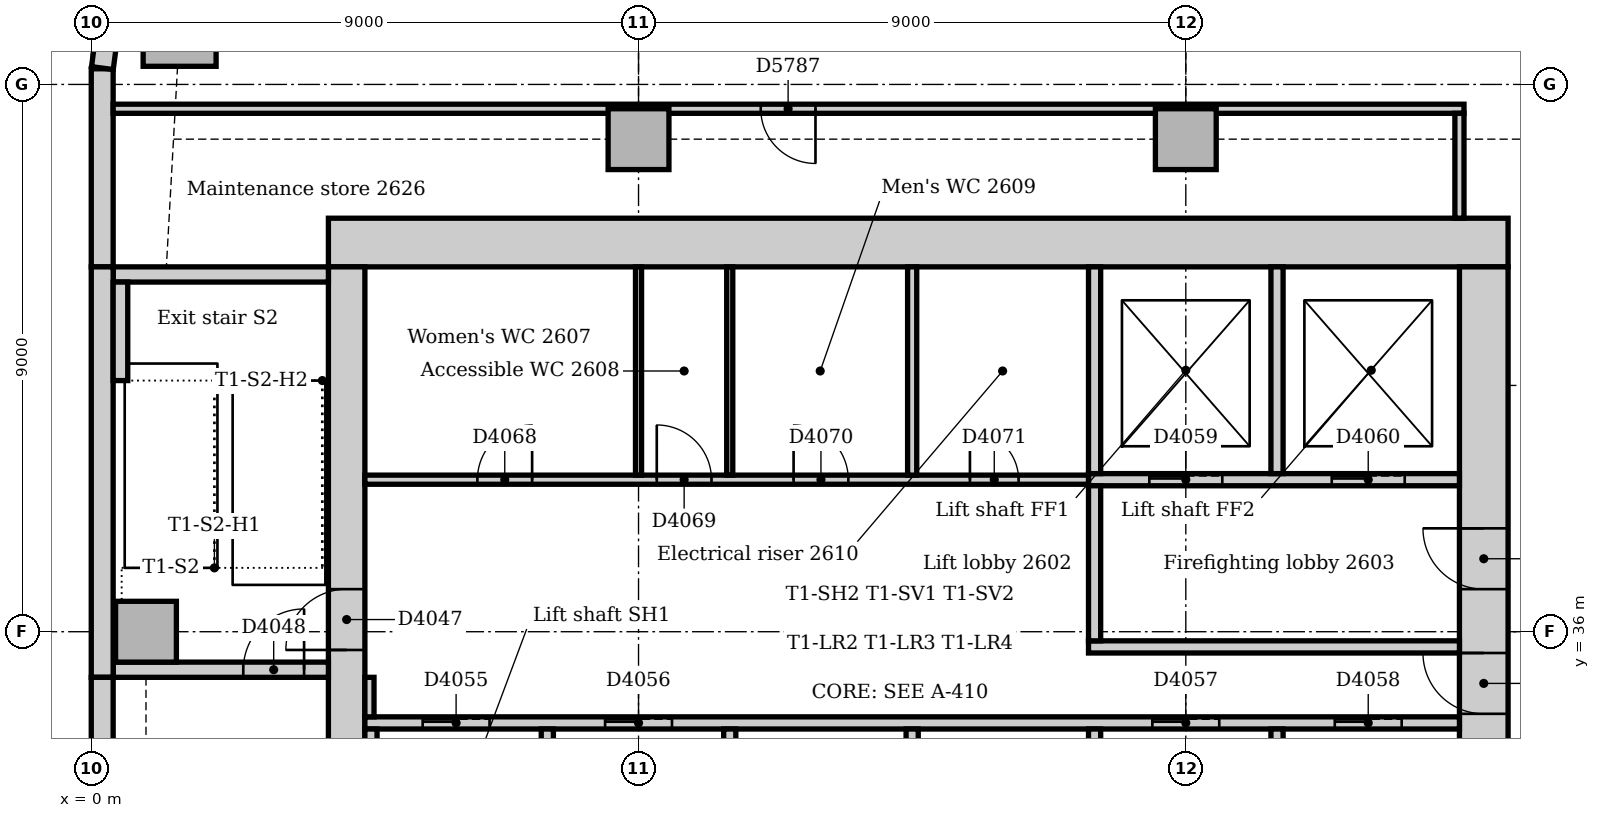
"""IFC4 building model, lengths in metres.
Left out: names, types, materials, properties, quantities, classifications, styles, units other than length and angle.
Written with IfcOpenShell. Run it as: python <this file> out.ifc"""

import sys

from ifc_helpers import new_model, si_unit, direction, frame, frame_2d, origin, origin_2d, place, context, subcontext, project, spatial, rectangle, extrude, element, fill, save


model = new_model("IFC4")
c1 = context("Model", 3, precision=1e-05, world=origin(), true_north=direction((0.0, 1.0)))
c2 = subcontext(c1, "Body", "Model", "MODEL_VIEW")
j1 = project(units=[si_unit("LENGTHUNIT", "METRE"), si_unit("PLANEANGLEUNIT", "RADIAN")], contexts=[c1])
p1 = place(None, origin())
s1 = spatial("IfcSite", under=j1, at=p1, CompositionType="ELEMENT")
p2 = place(p1, origin())
s2 = spatial("IfcBuilding", under=s1, at=p2, CompositionType="ELEMENT")
p3 = place(p2, frame((0.0, 0.0, 112.0)))
s3 = spatial("IfcBuildingStorey", under=s2, at=p3, CompositionType="ELEMENT", Elevation=112.0)
p4 = place(p3, frame((23.3, 42.4, 0.0), z_axis=(0.0, 0.0, 1.0), x_axis=(-1.0, 0.0, 0.0)))
e1 = element("IfcWall", 1, at=p4, inside=s3, PredefinedType="SOLIDWALL", context=c2, shape_type="SweptSolid", body=[
    extrude(rectangle(XDim=19.4, YDim=0.8, at=frame_2d((9.7, 0.0))), origin(), (0.0, 0.0, 1.0), 4.0),
])
p5 = place(p3, frame((22.9, 31.5, 0.0), z_axis=(0.0, 0.0, 1.0), x_axis=(0.0, 1.0, 0.0)))
e2 = element("IfcWall", 2, at=p5, inside=s3, PredefinedType="SOLIDWALL", context=c2, shape_type="SweptSolid", body=[
    extrude(rectangle(XDim=10.5, YDim=0.8, at=frame_2d((5.25, 0.0))), origin(), (0.0, 0.0, 1.0), 4.0),
])
p6 = place(p5, frame((3.15, 0.0, 0.0)))
e3 = element("IfcOpeningElement", 3, at=p6, cuts=e2, PredefinedType="OPENING", context=c2, shape_type="SweptSolid", body=[
    extrude(rectangle(XDim=1.0, YDim=2.1, at=frame_2d((0.5, 1.05))), frame((0.0, 0.41, 0.0), z_axis=(0.0, -1.0, 0.0), x_axis=(1.0, 0.0, 0.0)), (0.0, 0.0, 1.0), 0.82),
])
p7 = place(p5, frame((5.2, 0.0, 0.0)))
e4 = element("IfcOpeningElement", 4, at=p7, cuts=e2, PredefinedType="OPENING", context=c2, shape_type="SweptSolid", body=[
    extrude(rectangle(XDim=1.0, YDim=2.1, at=frame_2d((0.5, 1.05))), frame((0.0, 0.41, 0.0), z_axis=(0.0, -1.0, 0.0), x_axis=(1.0, 0.0, 0.0)), (0.0, 0.0, 1.0), 0.82),
])
p8 = place(p3, frame((4.2, 42.0, 0.0), z_axis=(0.0, 0.0, 1.0), x_axis=(0.0, -1.0, 0.0)))
e5 = element("IfcWall", 5, at=p8, inside=s3, PredefinedType="SOLIDWALL", context=c2, shape_type="SweptSolid", body=[
    extrude(rectangle(XDim=10.5, YDim=0.6, at=frame_2d((5.25, 0.0))), origin(), (0.0, 0.0, 1.0), 4.0),
])
p9 = place(p8, frame((5.3, 0.0, 0.0)))
e6 = element("IfcOpeningElement", 6, at=p9, cuts=e5, PredefinedType="OPENING", context=c2, shape_type="SweptSolid", body=[
    extrude(rectangle(XDim=1.0, YDim=2.1, at=frame_2d((0.5, 1.05))), frame((0.0, 0.31, 0.0), z_axis=(0.0, -1.0, 0.0), x_axis=(1.0, 0.0, 0.0)), (0.0, 0.0, 1.0), 0.62),
])
p10 = place(p3, frame((0.36, 35.375, 0.0), z_axis=(0.0, 0.0, 1.0), x_axis=(1.0, 0.0, 0.0)))
e7 = element("IfcWall", 7, at=p10, inside=s3, PredefinedType="SOLIDWALL", context=c2, shape_type="SweptSolid", body=[
    extrude(rectangle(XDim=3.54, YDim=0.25, at=frame_2d((1.77, 0.0))), origin(), (0.0, 0.0, 1.0), 4.0),
])
p11 = place(p10, frame((2.14, 0.0, 0.0)))
e8 = element("IfcOpeningElement", 8, at=p11, cuts=e7, PredefinedType="OPENING", context=c2, shape_type="SweptSolid", body=[
    extrude(rectangle(XDim=1.0, YDim=2.1, at=frame_2d((0.5, 1.05))), frame((0.0, 0.135, 0.0), z_axis=(0.0, -1.0, 0.0), x_axis=(1.0, 0.0, 0.0)), (0.0, 0.0, 1.0), 0.27),
])
p12 = place(p3, frame((3.9, 41.875, 0.0), z_axis=(0.0, 0.0, 1.0), x_axis=(-1.0, 0.0, 0.0)))
e9 = element("IfcWall", 9, at=p12, inside=s3, PredefinedType="SOLIDWALL", context=c2, shape_type="SweptSolid", body=[
    extrude(rectangle(XDim=3.54, YDim=0.25, at=frame_2d((1.77, 0.0))), origin(), (0.0, 0.0, 1.0), 4.0),
])
p13 = place(p3, frame((1.453, 45.898, 0.0), z_axis=(0.0, 0.0, 1.0), x_axis=(1.0, 0.0, 0.0)))
e10 = element("IfcColumn", 10, at=p13, inside=s3, PredefinedType="COLUMN", context=c2, shape_type="SweptSolid", body=[
    extrude(rectangle(XDim=1.2, YDim=1.2, at=origin_2d()), origin(), (0.0, 0.0, 1.0), 3.85),
])
p14 = place(p3, frame((0.9, 36.0, 0.0), z_axis=(0.0, 0.0, 1.0), x_axis=(1.0, 0.0, 0.0)))
e11 = element("IfcColumn", 11, at=p14, inside=s3, PredefinedType="COLUMN", context=c2, shape_type="SweptSolid", body=[
    extrude(rectangle(XDim=1.0, YDim=1.0, at=origin_2d()), origin(), (0.0, 0.0, 1.0), 4.0),
])
for number, where, z_axis, x_axis in (
    (12, (9.0, 44.1, 0.0), (0.0, 0.0, 1.0), (1.0, 0.0, 0.0)),
    (13, (18.0, 44.1, 0.0), (0.0, 0.0, 1.0), (1.0, 0.0, 0.0)),
):
    element("IfcColumn", number, at=place(p3, frame(where, z_axis=z_axis, x_axis=x_axis)), inside=s3, PredefinedType="COLUMN", context=c2, shape_type="SweptSolid", body=[
        extrude(rectangle(XDim=1.0, YDim=1.0, at=origin_2d()), origin(), (0.0, 0.0, 1.0), 3.85),
    ])
p15 = place(p3, frame((0.18, 45.257, 0.0), z_axis=(0.0, 0.0, 1.0), x_axis=(0.0, -1.0, 0.0)))
e14 = element("IfcWall", 14, at=p15, inside=s3, PredefinedType="STANDARD", context=c2, shape_type="SweptSolid", body=[
    extrude(rectangle(XDim=3.257, YDim=0.36, at=frame_2d((1.629, 0.0))), origin(), (0.0, 0.0, 1.0), 3.85),
])
p16 = place(p3, frame((0.18, 42.0, 0.0), z_axis=(0.0, 0.0, 1.0), x_axis=(0.0, -1.0, 0.0)))
e15 = element("IfcWall", 15, at=p16, inside=s3, PredefinedType="STANDARD", context=c2, shape_type="SweptSolid", body=[
    extrude(rectangle(XDim=6.75, YDim=0.36, at=frame_2d((3.375, 0.0))), origin(), (0.0, 0.0, 1.0), 3.85),
])
p17 = place(p3, frame((0.18, 35.25, 0.0), z_axis=(0.0, 0.0, 1.0), x_axis=(0.0, -1.0, 0.0)))
e16 = element("IfcWall", 16, at=p17, inside=s3, PredefinedType="STANDARD", context=c2, shape_type="SweptSolid", body=[
    extrude(rectangle(XDim=7.5, YDim=0.36, at=frame_2d((3.75, 0.0))), origin(), (0.0, 0.0, 1.0), 3.85),
])
p18 = place(p3, frame((0.276, 45.976, 0.0), z_axis=(0.0, 0.0, 1.0), x_axis=(-0.13055608231, -0.99144092581, 0.0)))
e17 = element("IfcWall", 17, at=p18, inside=s3, PredefinedType="STANDARD", context=c2, shape_type="SweptSolid", body=[
    extrude(rectangle(XDim=0.713, YDim=0.36, at=frame_2d((0.356, 0.0))), origin(), (0.0, 0.0, 1.0), 3.85),
])
p19 = place(p3, frame((0.48, 40.13, 0.0), z_axis=(0.0, 0.0, 1.0), x_axis=(0.0, 1.0, 0.0)))
e18 = element("IfcWall", 18, at=p19, inside=s3, PredefinedType="STANDARD", context=c2, shape_type="SweptSolid", body=[
    extrude(rectangle(XDim=1.62, YDim=0.24, at=frame_2d((0.81, 0.0))), origin(), (0.0, 0.0, 1.0), 4.0),
])
p20 = place(p3, frame((16.4, 35.75, 0.0), z_axis=(0.0, 0.0, 1.0), x_axis=(1.0, 0.0, 0.0)))
e19 = element("IfcWall", 19, at=p20, inside=s3, PredefinedType="PARTITIONING", context=c2, shape_type="SweptSolid", body=[
    extrude(rectangle(XDim=6.1, YDim=0.2, at=frame_2d((3.05, 0.0))), origin(), (0.0, 0.0, 1.0), 3.85),
])
p21 = place(p3, frame((16.4, 38.5, 0.0), z_axis=(0.0, 0.0, 1.0), x_axis=(1.0, 0.0, 0.0)))
e20 = element("IfcWall", 20, at=p21, inside=s3, PredefinedType="PARTITIONING", context=c2, shape_type="SweptSolid", body=[
    extrude(rectangle(XDim=6.1, YDim=0.2, at=frame_2d((3.05, 0.0))), origin(), (0.0, 0.0, 1.0), 3.85),
])
p22 = place(p21, frame((1.0, 0.0, 0.0)))
e21 = element("IfcOpeningElement", 21, at=p22, cuts=e20, PredefinedType="OPENING", context=c2, shape_type="SweptSolid", body=[
    extrude(rectangle(XDim=1.2, YDim=2.1, at=frame_2d((0.6, 1.05))), frame((0.0, 0.11, 0.0), z_axis=(0.0, -1.0, 0.0), x_axis=(1.0, 0.0, 0.0)), (0.0, 0.0, 1.0), 0.22),
])
p23 = place(p21, frame((4.0, 0.0, 0.0)))
e22 = element("IfcOpeningElement", 22, at=p23, cuts=e20, PredefinedType="OPENING", context=c2, shape_type="SweptSolid", body=[
    extrude(rectangle(XDim=1.2, YDim=2.1, at=frame_2d((0.6, 1.05))), frame((0.0, 0.11, 0.0), z_axis=(0.0, -1.0, 0.0), x_axis=(1.0, 0.0, 0.0)), (0.0, 0.0, 1.0), 0.22),
])
p24 = place(p3, frame((16.5, 35.85, 0.0), z_axis=(0.0, 0.0, 1.0), x_axis=(0.0, 1.0, 0.0)))
e23 = element("IfcWall", 23, at=p24, inside=s3, PredefinedType="PARTITIONING", context=c2, shape_type="SweptSolid", body=[
    extrude(rectangle(XDim=2.55, YDim=0.2, at=frame_2d((1.275, 0.0))), origin(), (0.0, 0.0, 1.0), 3.85),
])
p25 = place(p3, frame((4.5, 34.5, 0.0), z_axis=(0.0, 0.0, 1.0), x_axis=(1.0, 0.0, 0.0)))
e24 = element("IfcWall", 24, at=p25, inside=s3, PredefinedType="PARTITIONING", context=c2, shape_type="SweptSolid", body=[
    extrude(rectangle(XDim=18.0, YDim=0.2, at=frame_2d((9.0, 0.0))), origin(), (0.0, 0.0, 1.0), 3.85),
])
p26 = place(p25, frame((0.95, 0.0, 0.0)))
e25 = element("IfcOpeningElement", 25, at=p26, cuts=e24, PredefinedType="OPENING", context=c2, shape_type="SweptSolid", body=[
    extrude(rectangle(XDim=1.1, YDim=2.1, at=frame_2d((0.55, 1.05))), frame((0.0, 0.11, 0.0), z_axis=(0.0, -1.0, 0.0), x_axis=(1.0, 0.0, 0.0)), (0.0, 0.0, 1.0), 0.22),
])
p27 = place(p25, frame((3.95, 0.0, 0.0)))
e26 = element("IfcOpeningElement", 26, at=p27, cuts=e24, PredefinedType="OPENING", context=c2, shape_type="SweptSolid", body=[
    extrude(rectangle(XDim=1.1, YDim=2.1, at=frame_2d((0.55, 1.05))), frame((0.0, 0.11, 0.0), z_axis=(0.0, -1.0, 0.0), x_axis=(1.0, 0.0, 0.0)), (0.0, 0.0, 1.0), 0.22),
])
p28 = place(p25, frame((12.95, 0.0, 0.0)))
e27 = element("IfcOpeningElement", 27, at=p28, cuts=e24, PredefinedType="OPENING", context=c2, shape_type="SweptSolid", body=[
    extrude(rectangle(XDim=1.1, YDim=2.1, at=frame_2d((0.55, 1.05))), frame((0.0, 0.11, 0.0), z_axis=(0.0, -1.0, 0.0), x_axis=(1.0, 0.0, 0.0)), (0.0, 0.0, 1.0), 0.22),
])
p29 = place(p25, frame((15.95, 0.0, 0.0)))
e28 = element("IfcOpeningElement", 28, at=p29, cuts=e24, PredefinedType="OPENING", context=c2, shape_type="SweptSolid", body=[
    extrude(rectangle(XDim=1.1, YDim=2.1, at=frame_2d((0.55, 1.05))), frame((0.0, 0.11, 0.0), z_axis=(0.0, -1.0, 0.0), x_axis=(1.0, 0.0, 0.0)), (0.0, 0.0, 1.0), 0.22),
])
for number, where, z_axis, x_axis in (
    (29, (16.5, 38.6, 0.0), (0.0, 0.0, 1.0), (0.0, 1.0, 0.0)),
    (30, (19.5, 38.6, 0.0), (0.0, 0.0, 1.0), (0.0, 1.0, 0.0)),
):
    element("IfcWall", number, at=place(p3, frame(where, z_axis=z_axis, x_axis=x_axis)), inside=s3, PredefinedType="PARTITIONING", context=c2, shape_type="SweptSolid", body=[
        extrude(rectangle(XDim=3.4, YDim=0.2, at=frame_2d((1.7, 0.0))), origin(), (0.0, 0.0, 1.0), 3.85),
    ])
for number, where, z_axis, x_axis in (
    (31, (4.6, 31.75, 0.0), (0.0, 0.0, 1.0), (0.0, 1.0, 0.0)),
    (32, (7.5, 31.75, 0.0), (0.0, 0.0, 1.0), (0.0, 1.0, 0.0)),
    (33, (10.5, 31.75, 0.0), (0.0, 0.0, 1.0), (0.0, 1.0, 0.0)),
    (34, (13.5, 31.75, 0.0), (0.0, 0.0, 1.0), (0.0, 1.0, 0.0)),
    (35, (16.5, 31.75, 0.0), (0.0, 0.0, 1.0), (0.0, 1.0, 0.0)),
    (36, (19.5, 31.75, 0.0), (0.0, 0.0, 1.0), (0.0, 1.0, 0.0)),
):
    element("IfcWall", number, at=place(p3, frame(where, z_axis=z_axis, x_axis=x_axis)), inside=s3, PredefinedType="PARTITIONING", context=c2, shape_type="SweptSolid", body=[
        extrude(rectangle(XDim=2.65, YDim=0.2, at=frame_2d((1.325, 0.0))), origin(), (0.0, 0.0, 1.0), 3.85),
    ])
p30 = place(p3, frame((0.36, 44.6, 0.0), z_axis=(0.0, 0.0, 1.0), x_axis=(1.0, 0.0, 0.0)))
e37 = element("IfcWall", 37, at=p30, inside=s3, PredefinedType="PARTITIONING", context=c2, shape_type="SweptSolid", body=[
    extrude(rectangle(XDim=22.215, YDim=0.15, at=frame_2d((11.107, 0.0))), origin(), (0.0, 0.0, 1.0), 3.85),
])
p31 = place(p30, frame((10.65, 0.0, 0.0)))
e38 = element("IfcOpeningElement", 38, at=p31, cuts=e37, PredefinedType="OPENING", context=c2, shape_type="SweptSolid", body=[
    extrude(rectangle(XDim=0.9, YDim=2.1, at=frame_2d((0.45, 1.05))), frame((0.0, 0.085, 0.0), z_axis=(0.0, -1.0, 0.0), x_axis=(1.0, 0.0, 0.0)), (0.0, 0.0, 1.0), 0.17),
])
p32 = place(p3, frame((4.5, 38.5, 0.0), z_axis=(0.0, 0.0, 1.0), x_axis=(1.0, 0.0, 0.0)))
e39 = element("IfcWall", 39, at=p32, inside=s3, PredefinedType="PARTITIONING", context=c2, shape_type="SweptSolid", body=[
    extrude(rectangle(XDim=11.9, YDim=0.15, at=frame_2d((5.95, 0.0))), origin(), (0.0, 0.0, 1.0), 3.85),
])
p33 = place(p32, frame((1.85, 0.0, 0.0)))
e40 = element("IfcOpeningElement", 40, at=p33, cuts=e39, PredefinedType="OPENING", context=c2, shape_type="SweptSolid", body=[
    extrude(rectangle(XDim=0.9, YDim=2.1, at=frame_2d((0.45, 1.05))), frame((0.0, 0.085, 0.0), z_axis=(0.0, -1.0, 0.0), x_axis=(1.0, 0.0, 0.0)), (0.0, 0.0, 1.0), 0.17),
])
p34 = place(p32, frame((4.8, 0.0, 0.0)))
e41 = element("IfcOpeningElement", 41, at=p34, cuts=e39, PredefinedType="OPENING", context=c2, shape_type="SweptSolid", body=[
    extrude(rectangle(XDim=0.9, YDim=2.1, at=frame_2d((0.45, 1.05))), frame((0.0, 0.085, 0.0), z_axis=(0.0, -1.0, 0.0), x_axis=(1.0, 0.0, 0.0)), (0.0, 0.0, 1.0), 0.17),
])
p35 = place(p32, frame((7.05, 0.0, 0.0)))
e42 = element("IfcOpeningElement", 42, at=p35, cuts=e39, PredefinedType="OPENING", context=c2, shape_type="SweptSolid", body=[
    extrude(rectangle(XDim=0.9, YDim=2.1, at=frame_2d((0.45, 1.05))), frame((0.0, 0.085, 0.0), z_axis=(0.0, -1.0, 0.0), x_axis=(1.0, 0.0, 0.0)), (0.0, 0.0, 1.0), 0.17),
])
p36 = place(p32, frame((9.95, 0.0, 0.0)))
e43 = element("IfcOpeningElement", 43, at=p36, cuts=e39, PredefinedType="OPENING", context=c2, shape_type="SweptSolid", body=[
    extrude(rectangle(XDim=0.8, YDim=2.1, at=frame_2d((0.4, 1.05))), frame((0.0, 0.085, 0.0), z_axis=(0.0, -1.0, 0.0), x_axis=(1.0, 0.0, 0.0)), (0.0, 0.0, 1.0), 0.17),
])
p37 = place(p3, frame((22.5, 42.8, 0.0), z_axis=(0.0, 0.0, 1.0), x_axis=(0.0, 1.0, 0.0)))
e44 = element("IfcWall", 44, at=p37, inside=s3, PredefinedType="PARTITIONING", context=c2, shape_type="SweptSolid", body=[
    extrude(rectangle(XDim=1.725, YDim=0.15, at=frame_2d((0.863, 0.0))), origin(), (0.0, 0.0, 1.0), 3.85),
])
p38 = place(p3, frame((4.575, 34.6, 0.0), z_axis=(0.0, 0.0, 1.0), x_axis=(0.0, 1.0, 0.0)))
e45 = element("IfcWall", 45, at=p38, inside=s3, PredefinedType="PARTITIONING", context=c2, shape_type="SweptSolid", body=[
    extrude(rectangle(XDim=0.65, YDim=0.15, at=frame_2d((0.325, 0.0))), origin(), (0.0, 0.0, 1.0), 3.85),
])
p39 = place(p3, frame((13.5, 38.575, 0.0), z_axis=(0.0, 0.0, 1.0), x_axis=(0.0, 1.0, 0.0)))
e46 = element("IfcWall", 46, at=p39, inside=s3, PredefinedType="PARTITIONING", context=c2, shape_type="SweptSolid", body=[
    extrude(rectangle(XDim=3.425, YDim=0.15, at=frame_2d((1.712, 0.0))), origin(), (0.0, 0.0, 1.0), 3.85),
])
for number, where, z_axis, x_axis in (
    (47, (9.0, 38.575, 0.0), (0.0, 0.0, 1.0), (0.0, 1.0, 0.0)),
    (48, (10.5, 38.575, 0.0), (0.0, 0.0, 1.0), (0.0, 1.0, 0.0)),
):
    element("IfcWall", number, at=place(p3, frame(where, z_axis=z_axis, x_axis=x_axis)), inside=s3, PredefinedType="PARTITIONING", context=c2, shape_type="SweptSolid", body=[
        extrude(rectangle(XDim=3.425, YDim=0.1, at=frame_2d((1.712, 0.0))), origin(), (0.0, 0.0, 1.0), 3.85),
    ])
p40 = place(p9, frame((1.0, 0.0, 0.0), z_axis=(0.0, 0.0, 1.0), x_axis=(-1.0, 0.0, 0.0)))
e49 = element("IfcDoor", 49, at=p40, inside=s3, OperationType="SINGLE_SWING_LEFT", PredefinedType="DOOR", context=c2, shape_type="SweptSolid", body=[
    extrude(rectangle(XDim=1.0, YDim=2.1, at=frame_2d((0.5, 1.05))), frame((0.0, 0.025, 0.0), z_axis=(0.0, -1.0, 0.0), x_axis=(1.0, 0.0, 0.0)), (0.0, 0.0, 1.0), 0.05),
])
fill(e6, e49)
p41 = place(p11, origin())
e50 = element("IfcDoor", 50, at=p41, inside=s3, OperationType="SINGLE_SWING_RIGHT", PredefinedType="DOOR", context=c2, shape_type="SweptSolid", body=[
    extrude(rectangle(XDim=1.0, YDim=2.1, at=frame_2d((0.5, 1.05))), frame((0.0, 0.025, 0.0), z_axis=(0.0, -1.0, 0.0), x_axis=(1.0, 0.0, 0.0)), (0.0, 0.0, 1.0), 0.05),
])
fill(e8, e50)
p42 = place(p26, origin())
e51 = element("IfcDoor", 51, at=p42, inside=s3, OperationType="SLIDING_TO_LEFT", PredefinedType="DOOR", context=c2, shape_type="SweptSolid", body=[
    extrude(rectangle(XDim=1.1, YDim=2.1, at=frame_2d((0.55, 1.05))), frame((0.0, 0.025, 0.0), z_axis=(0.0, -1.0, 0.0), x_axis=(1.0, 0.0, 0.0)), (0.0, 0.0, 1.0), 0.05),
])
fill(e25, e51)
p43 = place(p27, origin())
e52 = element("IfcDoor", 52, at=p43, inside=s3, OperationType="SLIDING_TO_LEFT", PredefinedType="DOOR", context=c2, shape_type="SweptSolid", body=[
    extrude(rectangle(XDim=1.1, YDim=2.1, at=frame_2d((0.55, 1.05))), frame((0.0, 0.025, 0.0), z_axis=(0.0, -1.0, 0.0), x_axis=(1.0, 0.0, 0.0)), (0.0, 0.0, 1.0), 0.05),
])
fill(e26, e52)
p44 = place(p28, origin())
e53 = element("IfcDoor", 53, at=p44, inside=s3, OperationType="SLIDING_TO_LEFT", PredefinedType="DOOR", context=c2, shape_type="SweptSolid", body=[
    extrude(rectangle(XDim=1.1, YDim=2.1, at=frame_2d((0.55, 1.05))), frame((0.0, 0.025, 0.0), z_axis=(0.0, -1.0, 0.0), x_axis=(1.0, 0.0, 0.0)), (0.0, 0.0, 1.0), 0.05),
])
fill(e27, e53)
p45 = place(p29, origin())
e54 = element("IfcDoor", 54, at=p45, inside=s3, OperationType="SLIDING_TO_LEFT", PredefinedType="DOOR", context=c2, shape_type="SweptSolid", body=[
    extrude(rectangle(XDim=1.1, YDim=2.1, at=frame_2d((0.55, 1.05))), frame((0.0, 0.025, 0.0), z_axis=(0.0, -1.0, 0.0), x_axis=(1.0, 0.0, 0.0)), (0.0, 0.0, 1.0), 0.05),
])
fill(e28, e54)
p46 = place(p22, origin())
e55 = element("IfcDoor", 55, at=p46, inside=s3, OperationType="SLIDING_TO_LEFT", PredefinedType="DOOR", context=c2, shape_type="SweptSolid", body=[
    extrude(rectangle(XDim=1.2, YDim=2.1, at=frame_2d((0.6, 1.05))), frame((0.0, 0.025, 0.0), z_axis=(0.0, -1.0, 0.0), x_axis=(1.0, 0.0, 0.0)), (0.0, 0.0, 1.0), 0.05),
])
fill(e21, e55)
p47 = place(p23, origin())
e56 = element("IfcDoor", 56, at=p47, inside=s3, OperationType="SLIDING_TO_LEFT", PredefinedType="DOOR", context=c2, shape_type="SweptSolid", body=[
    extrude(rectangle(XDim=1.2, YDim=2.1, at=frame_2d((0.6, 1.05))), frame((0.0, 0.025, 0.0), z_axis=(0.0, -1.0, 0.0), x_axis=(1.0, 0.0, 0.0)), (0.0, 0.0, 1.0), 0.05),
])
fill(e22, e56)
p48 = place(p6, origin())
e57 = element("IfcDoor", 57, at=p48, inside=s3, OperationType="SINGLE_SWING_RIGHT", PredefinedType="DOOR", context=c2, shape_type="SweptSolid", body=[
    extrude(rectangle(XDim=1.0, YDim=2.1, at=frame_2d((0.5, 1.05))), frame((0.0, 0.025, 0.0), z_axis=(0.0, -1.0, 0.0), x_axis=(1.0, 0.0, 0.0)), (0.0, 0.0, 1.0), 0.05),
])
fill(e3, e57)
p49 = place(p7, origin())
e58 = element("IfcDoor", 58, at=p49, inside=s3, OperationType="SINGLE_SWING_RIGHT", PredefinedType="DOOR", context=c2, shape_type="SweptSolid", body=[
    extrude(rectangle(XDim=1.0, YDim=2.1, at=frame_2d((0.5, 1.05))), frame((0.0, 0.025, 0.0), z_axis=(0.0, -1.0, 0.0), x_axis=(1.0, 0.0, 0.0)), (0.0, 0.0, 1.0), 0.05),
])
fill(e4, e58)
p50 = place(p33, origin())
e59 = element("IfcDoor", 59, at=p50, inside=s3, OperationType="SINGLE_SWING_RIGHT", PredefinedType="DOOR", context=c2, shape_type="SweptSolid", body=[
    extrude(rectangle(XDim=0.9, YDim=2.1, at=frame_2d((0.45, 1.05))), frame((0.0, 0.025, 0.0), z_axis=(0.0, -1.0, 0.0), x_axis=(1.0, 0.0, 0.0)), (0.0, 0.0, 1.0), 0.05),
])
fill(e40, e59)
p51 = place(p34, origin())
e60 = element("IfcDoor", 60, at=p51, inside=s3, OperationType="SINGLE_SWING_LEFT", PredefinedType="DOOR", context=c2, shape_type="SweptSolid", body=[
    extrude(rectangle(XDim=0.9, YDim=2.1, at=frame_2d((0.45, 1.05))), frame((0.0, 0.025, 0.0), z_axis=(0.0, -1.0, 0.0), x_axis=(1.0, 0.0, 0.0)), (0.0, 0.0, 1.0), 0.05),
])
fill(e41, e60)
p52 = place(p35, origin())
e61 = element("IfcDoor", 61, at=p52, inside=s3, OperationType="SINGLE_SWING_LEFT", PredefinedType="DOOR", context=c2, shape_type="SweptSolid", body=[
    extrude(rectangle(XDim=0.9, YDim=2.1, at=frame_2d((0.45, 1.05))), frame((0.0, 0.025, 0.0), z_axis=(0.0, -1.0, 0.0), x_axis=(1.0, 0.0, 0.0)), (0.0, 0.0, 1.0), 0.05),
])
fill(e42, e61)
p53 = place(p36, origin())
e62 = element("IfcDoor", 62, at=p53, inside=s3, OperationType="SINGLE_SWING_LEFT", PredefinedType="DOOR", context=c2, shape_type="SweptSolid", body=[
    extrude(rectangle(XDim=0.8, YDim=2.1, at=frame_2d((0.4, 1.05))), frame((0.0, 0.025, 0.0), z_axis=(0.0, -1.0, 0.0), x_axis=(1.0, 0.0, 0.0)), (0.0, 0.0, 1.0), 0.05),
])
fill(e43, e62)
p54 = place(p31, frame((0.9, 0.0, 0.0), z_axis=(0.0, 0.0, 1.0), x_axis=(-1.0, 0.0, 0.0)))
e63 = element("IfcDoor", 63, at=p54, inside=s3, OperationType="SINGLE_SWING_LEFT", PredefinedType="DOOR", context=c2, shape_type="SweptSolid", body=[
    extrude(rectangle(XDim=0.9, YDim=2.1, at=frame_2d((0.45, 1.05))), frame((0.0, 0.025, 0.0), z_axis=(0.0, -1.0, 0.0), x_axis=(1.0, 0.0, 0.0)), (0.0, 0.0, 1.0), 0.05),
])
fill(e38, e63)
save(model, sys.argv[1])
